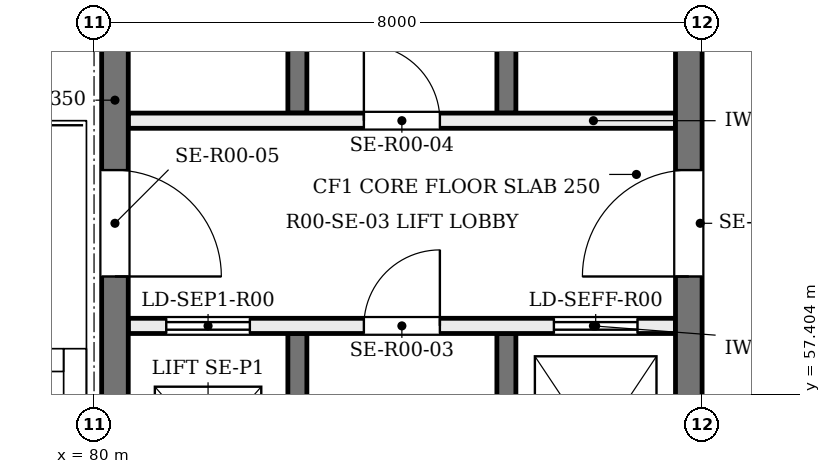
"""IFC4 building model, lengths in metres.
Left out: names, types, materials, properties, quantities, classifications, styles, units other than length and angle.
Written with IfcOpenShell. Run it as: python <this file> out.ifc"""

import sys

from ifc_helpers import new_model, si_unit, direction, frame, frame_2d, origin, place, context, subcontext, project, spatial, rectangle, extrude, element, fill, save


model = new_model("IFC4")
c1 = context("Model", 3, precision=1e-05, world=origin(), true_north=direction((0.0, 1.0)))
c2 = subcontext(c1, "Body", "Model", "MODEL_VIEW")
j1 = project(units=[si_unit("LENGTHUNIT", "METRE"), si_unit("PLANEANGLEUNIT", "RADIAN")], contexts=[c1])
p1 = place(None, origin())
s1 = spatial("IfcSite", under=j1, at=p1, CompositionType="ELEMENT")
p2 = place(p1, origin())
s2 = spatial("IfcBuilding", under=s1, at=p2, CompositionType="ELEMENT")
p3 = place(p2, frame((0.0, 0.0, 33.6)))
s3 = spatial("IfcBuildingStorey", under=s2, at=p3, CompositionType="ELEMENT", Elevation=33.6)
p4 = place(p3, frame((79.75, 51.0, 0.0), z_axis=(0.0, 0.0, 1.0), x_axis=(0.0, 1.0, 0.0)))
e1 = element("IfcWall", 1, at=p4, inside=s3, PredefinedType="PARAPET", context=c2, shape_type="SweptSolid", body=[
    extrude(rectangle(XDim=7.0, YDim=0.3, at=frame_2d((3.5, 0.0))), origin(), (0.0, 0.0, 1.0), 1.1),
])
p5 = place(p3, frame((24.4, 57.85, 0.0), z_axis=(0.0, 0.0, 1.0), x_axis=(1.0, 0.0, 0.0)))
e2 = element("IfcWall", 2, at=p5, inside=s3, PredefinedType="PARAPET", context=c2, shape_type="SweptSolid", body=[
    extrude(rectangle(XDim=55.2, YDim=0.3, at=frame_2d((27.6, 0.0))), origin(), (0.0, 0.0, 1.0), 1.1),
])
p6 = place(p3, frame((85.425, 55.2, 0.0), z_axis=(0.0, 0.0, 1.0), x_axis=(0.0, 1.0, 0.0)))
e3 = element("IfcWall", 3, at=p6, inside=s3, PredefinedType="SOLIDWALL", context=c2, shape_type="SweptSolid", body=[
    extrude(rectangle(XDim=3.0, YDim=0.25, at=frame_2d((1.5, 0.0))), origin(), (0.0, 0.0, 1.0), 4.5),
])
p7 = place(p3, frame((85.425, 61.1, 0.0), z_axis=(0.0, 0.0, 1.0), x_axis=(0.0, 1.0, 0.0)))
e4 = element("IfcWall", 4, at=p7, inside=s3, PredefinedType="SOLIDWALL", context=c2, shape_type="SweptSolid", body=[
    extrude(rectangle(XDim=2.45, YDim=0.25, at=frame_2d((1.225, 0.0))), origin(), (0.0, 0.0, 1.0), 4.5),
])
p8 = place(p3, frame((82.675, 55.2, 0.0), z_axis=(0.0, 0.0, 1.0), x_axis=(0.0, 1.0, 0.0)))
e5 = element("IfcWall", 5, at=p8, inside=s3, PredefinedType="SOLIDWALL", context=c2, shape_type="SweptSolid", body=[
    extrude(rectangle(XDim=3.0, YDim=0.25, at=frame_2d((1.5, 0.0))), origin(), (0.0, 0.0, 1.0), 4.5),
])
p9 = place(p3, frame((82.675, 61.1, 0.0), z_axis=(0.0, 0.0, 1.0), x_axis=(0.0, 1.0, 0.0)))
e6 = element("IfcWall", 6, at=p9, inside=s3, PredefinedType="SOLIDWALL", context=c2, shape_type="SweptSolid", body=[
    extrude(rectangle(XDim=2.45, YDim=0.25, at=frame_2d((1.225, 0.0))), origin(), (0.0, 0.0, 1.0), 4.5),
])
p10 = place(p3, frame((87.65, 58.3, 0.0), z_axis=(0.0, 0.0, 1.0), x_axis=(-1.0, 0.0, 0.0)))
e7 = element("IfcWall", 7, at=p10, inside=s3, PredefinedType="SOLIDWALL", context=c2, shape_type="SweptSolid", body=[
    extrude(rectangle(XDim=7.2, YDim=0.2, at=frame_2d((3.6, 0.0))), origin(), (0.0, 0.0, 1.0), 4.5),
])
p11 = place(p10, frame((0.5, 0.0, 0.0)))
e8 = element("IfcOpeningElement", 8, at=p11, cuts=e7, PredefinedType="OPENING", context=c2, shape_type="SweptSolid", body=[
    extrude(rectangle(XDim=1.1, YDim=2.1, at=frame_2d((0.55, 1.05))), frame((0.0, 0.11, 0.0), z_axis=(0.0, -1.0, 0.0), x_axis=(1.0, 0.0, 0.0)), (0.0, 0.0, 1.0), 0.22),
])
p12 = place(p10, frame((5.6, 0.0, 0.0)))
e9 = element("IfcOpeningElement", 9, at=p12, cuts=e7, PredefinedType="OPENING", context=c2, shape_type="SweptSolid", body=[
    extrude(rectangle(XDim=1.1, YDim=2.1, at=frame_2d((0.55, 1.05))), frame((0.0, 0.11, 0.0), z_axis=(0.0, -1.0, 0.0), x_axis=(1.0, 0.0, 0.0)), (0.0, 0.0, 1.0), 0.22),
])
p13 = place(p10, frame((3.1, 0.0, 0.0)))
e10 = element("IfcOpeningElement", 10, at=p13, cuts=e7, PredefinedType="OPENING", context=c2, shape_type="SweptSolid", body=[
    extrude(rectangle(XDim=1.0, YDim=2.1, at=frame_2d((0.5, 1.05))), frame((0.0, 0.11, 0.0), z_axis=(0.0, -1.0, 0.0), x_axis=(1.0, 0.0, 0.0)), (0.0, 0.0, 1.0), 0.22),
])
p14 = place(p3, frame((87.65, 61.0, 0.0), z_axis=(0.0, 0.0, 1.0), x_axis=(-1.0, 0.0, 0.0)))
e11 = element("IfcWall", 11, at=p14, inside=s3, PredefinedType="SOLIDWALL", context=c2, shape_type="SweptSolid", body=[
    extrude(rectangle(XDim=7.2, YDim=0.2, at=frame_2d((3.6, 0.0))), origin(), (0.0, 0.0, 1.0), 4.5),
])
p15 = place(p14, frame((3.1, 0.0, 0.0)))
e12 = element("IfcOpeningElement", 12, at=p15, cuts=e11, PredefinedType="OPENING", context=c2, shape_type="SweptSolid", body=[
    extrude(rectangle(XDim=1.0, YDim=2.1, at=frame_2d((0.5, 1.05))), frame((0.0, 0.11, 0.0), z_axis=(0.0, -1.0, 0.0), x_axis=(1.0, 0.0, 0.0)), (0.0, 0.0, 1.0), 0.22),
])
p16 = place(p3, frame((87.825, 48.35, 0.0), z_axis=(0.0, 0.0, 1.0), x_axis=(0.0, 1.0, 0.0)))
e13 = element("IfcWall", 13, at=p16, inside=s3, PredefinedType="SOLIDWALL", context=c2, shape_type="SweptSolid", body=[
    extrude(rectangle(XDim=15.2, YDim=0.35, at=frame_2d((7.6, 0.0))), origin(), (0.0, 0.0, 1.0), 4.5),
])
p17 = place(p16, frame((0.95, 0.0, 0.0)))
e14 = element("IfcOpeningElement", 14, at=p17, cuts=e13, PredefinedType="OPENING", context=c2, shape_type="SweptSolid", body=[
    extrude(rectangle(XDim=1.0, YDim=2.1, at=frame_2d((0.5, 1.05))), frame((0.0, 0.185, 0.0), z_axis=(0.0, -1.0, 0.0), x_axis=(1.0, 0.0, 0.0)), (0.0, 0.0, 1.0), 0.37),
])
p18 = place(p16, frame((10.6, 0.0, 0.0)))
e15 = element("IfcOpeningElement", 15, at=p18, cuts=e13, PredefinedType="OPENING", context=c2, shape_type="SweptSolid", body=[
    extrude(rectangle(XDim=1.4, YDim=2.1, at=frame_2d((0.7, 1.05))), frame((0.0, 0.185, 0.0), z_axis=(0.0, -1.0, 0.0), x_axis=(1.0, 0.0, 0.0)), (0.0, 0.0, 1.0), 0.37),
])
p19 = place(p3, frame((80.275, 48.35, 0.0), z_axis=(0.0, 0.0, 1.0), x_axis=(0.0, 1.0, 0.0)))
e16 = element("IfcWall", 16, at=p19, inside=s3, PredefinedType="SOLIDWALL", context=c2, shape_type="SweptSolid", body=[
    extrude(rectangle(XDim=15.2, YDim=0.35, at=frame_2d((7.6, 0.0))), origin(), (0.0, 0.0, 1.0), 4.5),
])
p20 = place(p19, frame((0.95, 0.0, 0.0)))
e17 = element("IfcOpeningElement", 17, at=p20, cuts=e16, PredefinedType="OPENING", context=c2, shape_type="SweptSolid", body=[
    extrude(rectangle(XDim=1.0, YDim=2.1, at=frame_2d((0.5, 1.05))), frame((0.0, 0.185, 0.0), z_axis=(0.0, -1.0, 0.0), x_axis=(1.0, 0.0, 0.0)), (0.0, 0.0, 1.0), 0.37),
])
p21 = place(p19, frame((10.6, 0.0, 0.0)))
e18 = element("IfcOpeningElement", 18, at=p21, cuts=e16, PredefinedType="OPENING", context=c2, shape_type="SweptSolid", body=[
    extrude(rectangle(XDim=1.4, YDim=2.1, at=frame_2d((0.7, 1.05))), frame((0.0, 0.185, 0.0), z_axis=(0.0, -1.0, 0.0), x_axis=(1.0, 0.0, 0.0)), (0.0, 0.0, 1.0), 0.37),
])
p22 = place(p11, frame((1.1, 0.0, 0.0), z_axis=(0.0, 0.0, 1.0), x_axis=(-1.0, 0.0, 0.0)))
e19 = element("IfcDoor", 19, at=p22, inside=s3, OperationType="DOUBLE_DOOR_SLIDING", PredefinedType="DOOR", context=c2, shape_type="SweptSolid", body=[
    extrude(rectangle(XDim=1.1, YDim=2.1, at=frame_2d((0.55, 1.05))), frame((0.0, 0.025, 0.0), z_axis=(0.0, -1.0, 0.0), x_axis=(1.0, 0.0, 0.0)), (0.0, 0.0, 1.0), 0.05),
])
fill(e8, e19)
p23 = place(p12, frame((1.1, 0.0, 0.0), z_axis=(0.0, 0.0, 1.0), x_axis=(-1.0, 0.0, 0.0)))
e20 = element("IfcDoor", 20, at=p23, inside=s3, OperationType="DOUBLE_DOOR_SLIDING", PredefinedType="DOOR", context=c2, shape_type="SweptSolid", body=[
    extrude(rectangle(XDim=1.1, YDim=2.1, at=frame_2d((0.55, 1.05))), frame((0.0, 0.025, 0.0), z_axis=(0.0, -1.0, 0.0), x_axis=(1.0, 0.0, 0.0)), (0.0, 0.0, 1.0), 0.05),
])
fill(e9, e20)
p24 = place(p13, frame((1.0, 0.0, 0.0), z_axis=(0.0, 0.0, 1.0), x_axis=(-1.0, 0.0, 0.0)))
e21 = element("IfcDoor", 21, at=p24, inside=s3, OperationType="SINGLE_SWING_LEFT", PredefinedType="DOOR", context=c2, shape_type="SweptSolid", body=[
    extrude(rectangle(XDim=1.0, YDim=2.1, at=frame_2d((0.5, 1.05))), frame((0.0, 0.025, 0.0), z_axis=(0.0, -1.0, 0.0), x_axis=(1.0, 0.0, 0.0)), (0.0, 0.0, 1.0), 0.05),
])
fill(e10, e21)
p25 = place(p15, origin())
e22 = element("IfcDoor", 22, at=p25, inside=s3, OperationType="SINGLE_SWING_RIGHT", PredefinedType="DOOR", context=c2, shape_type="SweptSolid", body=[
    extrude(rectangle(XDim=1.0, YDim=2.1, at=frame_2d((0.5, 1.05))), frame((0.0, 0.025, 0.0), z_axis=(0.0, -1.0, 0.0), x_axis=(1.0, 0.0, 0.0)), (0.0, 0.0, 1.0), 0.05),
])
fill(e12, e22)
p26 = place(p21, frame((1.4, 0.0, 0.0), z_axis=(0.0, 0.0, 1.0), x_axis=(-1.0, 0.0, 0.0)))
e23 = element("IfcDoor", 23, at=p26, inside=s3, OperationType="SINGLE_SWING_LEFT", PredefinedType="DOOR", context=c2, shape_type="SweptSolid", body=[
    extrude(rectangle(XDim=1.4, YDim=2.1, at=frame_2d((0.7, 1.05))), frame((0.0, 0.025, 0.0), z_axis=(0.0, -1.0, 0.0), x_axis=(1.0, 0.0, 0.0)), (0.0, 0.0, 1.0), 0.05),
])
fill(e18, e23)
p27 = place(p18, origin())
e24 = element("IfcDoor", 24, at=p27, inside=s3, OperationType="SINGLE_SWING_LEFT", PredefinedType="DOOR", context=c2, shape_type="SweptSolid", body=[
    extrude(rectangle(XDim=1.4, YDim=2.1, at=frame_2d((0.7, 1.05))), frame((0.0, 0.025, 0.0), z_axis=(0.0, -1.0, 0.0), x_axis=(1.0, 0.0, 0.0)), (0.0, 0.0, 1.0), 0.05),
])
fill(e15, e24)
save(model, sys.argv[1])
